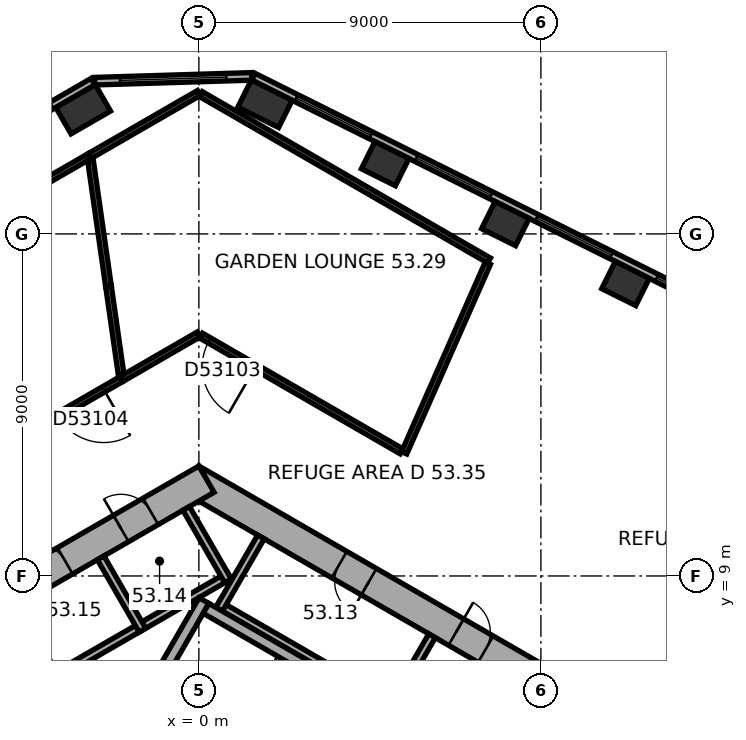
"""IFC4 building model, lengths in metres.
Left out: names, types, materials, properties, quantities, classifications, styles, units other than length and angle.
Written with IfcOpenShell. Run it as: python <this file> out.ifc"""

import sys

from ifc_helpers import new_model, si_unit, direction, frame, frame_2d, origin, origin_2d, place, context, subcontext, project, spatial, rectangle, extrude, element, fill, save


model = new_model("IFC4")
c1 = context("Model", 3, precision=1e-05, world=origin(), true_north=direction((0.0, 1.0)))
c2 = subcontext(c1, "Body", "Model", "MODEL_VIEW")
j1 = project(units=[si_unit("LENGTHUNIT", "METRE"), si_unit("PLANEANGLEUNIT", "RADIAN")], contexts=[c1])
p1 = place(None, origin())
s1 = spatial("IfcSite", under=j1, at=p1, CompositionType="ELEMENT")
p2 = place(p1, origin())
s2 = spatial("IfcBuilding", under=s1, at=p2, CompositionType="ELEMENT")
p3 = place(p2, frame((0.0, 0.0, 214.3)))
s3 = spatial("IfcBuildingStorey", under=s2, at=p3, CompositionType="ELEMENT", Elevation=214.3)
for number, where, z_axis, x_axis in (
    (1, (11.227, 16.695, 0.0), (0.0, 0.0, 1.0), (-0.895, 0.446, 0.0)),
    (2, (8.064, 18.271, 0.0), (0.0, 0.0, 1.0), (-0.895, 0.446, 0.0)),
    (3, (4.902, 19.848, 0.0), (0.0, 0.0, 1.0), (-0.895, 0.446, 0.0)),
):
    element("IfcColumn", number, at=place(p3, frame(where, z_axis=z_axis, x_axis=x_axis)), inside=s3, PredefinedType="COLUMN", context=c2, shape_type="SweptSolid", body=[
        extrude(rectangle(XDim=1.0, YDim=0.8, at=origin_2d()), origin(), (0.0, 0.0, 1.0), 7.4),
    ])
for number, where, z_axis, x_axis in (
    (4, (1.74, 21.425, 0.0), (0.0, 0.0, 1.0), (-0.895, 0.446, 0.0)),
    (5, (-3.044, 21.279, 0.0), (0.0, 0.0, 1.0), (-0.866, -0.5, 0.0)),
):
    element("IfcColumn", number, at=place(p3, frame(where, z_axis=z_axis, x_axis=x_axis)), inside=s3, PredefinedType="COLUMN", context=c2, shape_type="SweptSolid", body=[
        extrude(rectangle(XDim=1.2, YDim=0.8, at=origin_2d()), origin(), (0.0, 0.0, 1.0), 7.4),
    ])
p4 = place(p3, frame((10.1, 5.6, 0.0), z_axis=(0.0, 0.0, 1.0), x_axis=(-0.866023897231, 0.500002609418, 0.0)))
e6 = element("IfcWall", 6, at=p4, inside=s3, PredefinedType="SHEAR", context=c2, shape_type="SweptSolid", body=[
    extrude(rectangle(XDim=11.894, YDim=0.8, at=frame_2d((5.947, 0.0))), origin(), (0.0, 0.0, 1.0), 7.4),
])
p5 = place(p4, frame((2.947, 0.0, 0.0)))
e7 = element("IfcOpeningElement", 7, at=p5, cuts=e6, PredefinedType="OPENING", context=c2, shape_type="SweptSolid", body=[
    extrude(rectangle(XDim=0.9, YDim=2.1, at=frame_2d((0.45, 1.05))), frame((0.0, 0.41, 0.0), z_axis=(0.0, -1.0, 0.0), x_axis=(1.0, 0.0, 0.0)), (0.0, 0.0, 1.0), 0.82),
])
p6 = place(p4, frame((6.497, 0.0, 0.0)))
e8 = element("IfcOpeningElement", 8, at=p6, cuts=e6, PredefinedType="OPENING", context=c2, shape_type="SweptSolid", body=[
    extrude(rectangle(XDim=0.9, YDim=2.1, at=frame_2d((0.45, 1.05))), frame((0.0, 0.41, 0.0), z_axis=(0.0, -1.0, 0.0), x_axis=(1.0, 0.0, 0.0)), (0.0, 0.0, 1.0), 0.82),
])
p7 = place(p3, frame((0.2, 11.547, 0.0), z_axis=(0.0, 0.0, 1.0), x_axis=(-0.866023897231, -0.500002609418, 0.0)))
e9 = element("IfcWall", 9, at=p7, inside=s3, PredefinedType="SHEAR", context=c2, shape_type="SweptSolid", body=[
    extrude(rectangle(XDim=11.894, YDim=0.8, at=frame_2d((5.947, 0.0))), origin(), (0.0, 0.0, 1.0), 7.4),
])
p8 = place(p7, frame((6.147, 0.0, 0.0)))
e10 = element("IfcOpeningElement", 10, at=p8, cuts=e9, PredefinedType="OPENING", context=c2, shape_type="SweptSolid", body=[
    extrude(rectangle(XDim=1.5, YDim=2.1, at=frame_2d((0.75, 1.05))), frame((0.0, 0.41, 0.0), z_axis=(0.0, -1.0, 0.0), x_axis=(1.0, 0.0, 0.0)), (0.0, 0.0, 1.0), 0.82),
])
p9 = place(p7, frame((1.697, 0.0, 0.0)))
e11 = element("IfcOpeningElement", 11, at=p9, cuts=e9, PredefinedType="OPENING", context=c2, shape_type="SweptSolid", body=[
    extrude(rectangle(XDim=0.9, YDim=2.1, at=frame_2d((0.45, 1.05))), frame((0.0, 0.41, 0.0), z_axis=(0.0, -1.0, 0.0), x_axis=(1.0, 0.0, 0.0)), (0.0, 0.0, 1.0), 0.82),
])
p10 = place(p7, frame((4.297, 0.0, 0.0)))
e12 = element("IfcOpeningElement", 12, at=p10, cuts=e9, PredefinedType="OPENING", context=c2, shape_type="SweptSolid", body=[
    extrude(rectangle(XDim=0.9, YDim=2.1, at=frame_2d((0.45, 1.05))), frame((0.0, 0.41, 0.0), z_axis=(0.0, -1.0, 0.0), x_axis=(1.0, 0.0, 0.0)), (0.0, 0.0, 1.0), 0.82),
])
p11 = place(p3, frame((18.299, 13.727, 0.0), z_axis=(0.0, 0.0, 1.0), x_axis=(-0.894934554817, 0.44619742558, 0.0)))
e13 = element("IfcWall", 13, at=p11, inside=s3, PredefinedType="STANDARD", context=c2, shape_type="SweptSolid", body=[
    extrude(rectangle(XDim=18.841, YDim=0.2, at=frame_2d((9.421, 0.0))), origin(), (0.0, 0.0, 1.0), 7.4),
])
p12 = place(p11, frame((1.253, 0.0, 0.8)))
e14 = element("IfcOpeningElement", 14, at=p12, cuts=e13, PredefinedType="OPENING", context=c2, shape_type="SweptSolid", body=[
    extrude(rectangle(XDim=2.2, YDim=4.2, at=frame_2d((1.1, 2.1))), frame((0.0, 0.11, 0.0), z_axis=(0.0, -1.0, 0.0), x_axis=(1.0, 0.0, 0.0)), (0.0, 0.0, 1.0), 0.22),
])
p13 = place(p11, frame((4.786, 0.0, 0.8)))
e15 = element("IfcOpeningElement", 15, at=p13, cuts=e13, PredefinedType="OPENING", context=c2, shape_type="SweptSolid", body=[
    extrude(rectangle(XDim=2.2, YDim=4.2, at=frame_2d((1.1, 2.1))), frame((0.0, 0.11, 0.0), z_axis=(0.0, -1.0, 0.0), x_axis=(1.0, 0.0, 0.0)), (0.0, 0.0, 1.0), 0.22),
])
p14 = place(p11, frame((8.32, 0.0, 0.8)))
e16 = element("IfcOpeningElement", 16, at=p14, cuts=e13, PredefinedType="OPENING", context=c2, shape_type="SweptSolid", body=[
    extrude(rectangle(XDim=2.2, YDim=4.2, at=frame_2d((1.1, 2.1))), frame((0.0, 0.11, 0.0), z_axis=(0.0, -1.0, 0.0), x_axis=(1.0, 0.0, 0.0)), (0.0, 0.0, 1.0), 0.22),
])
p15 = place(p11, frame((11.854, 0.0, 0.8)))
e17 = element("IfcOpeningElement", 17, at=p15, cuts=e13, PredefinedType="OPENING", context=c2, shape_type="SweptSolid", body=[
    extrude(rectangle(XDim=2.2, YDim=4.2, at=frame_2d((1.1, 2.1))), frame((0.0, 0.11, 0.0), z_axis=(0.0, -1.0, 0.0), x_axis=(1.0, 0.0, 0.0)), (0.0, 0.0, 1.0), 0.22),
])
p16 = place(p11, frame((15.387, 0.0, 0.8)))
e18 = element("IfcOpeningElement", 18, at=p16, cuts=e13, PredefinedType="OPENING", context=c2, shape_type="SweptSolid", body=[
    extrude(rectangle(XDim=2.2, YDim=4.2, at=frame_2d((1.1, 2.1))), frame((0.0, 0.11, 0.0), z_axis=(0.0, -1.0, 0.0), x_axis=(1.0, 0.0, 0.0)), (0.0, 0.0, 1.0), 0.22),
])
p17 = place(p3, frame((1.389, 22.145, 0.0), z_axis=(0.0, 0.0, 1.0), x_axis=(-0.999534702881, -0.030502093955, 0.0)))
e19 = element("IfcWall", 19, at=p17, inside=s3, PredefinedType="STANDARD", context=c2, shape_type="SweptSolid", body=[
    extrude(rectangle(XDim=4.13, YDim=0.2, at=frame_2d((2.065, 0.0))), origin(), (0.0, 0.0, 1.0), 7.4),
])
p18 = place(p17, frame((0.665, 0.0, 0.8)))
e20 = element("IfcOpeningElement", 20, at=p18, cuts=e19, PredefinedType="OPENING", context=c2, shape_type="SweptSolid", body=[
    extrude(rectangle(XDim=2.8, YDim=4.2, at=frame_2d((1.4, 2.1))), frame((0.0, 0.11, 0.0), z_axis=(0.0, -1.0, 0.0), x_axis=(1.0, 0.0, 0.0)), (0.0, 0.0, 1.0), 0.22),
])
p19 = place(p3, frame((-2.786, 22.005, 0.0), z_axis=(0.0, 0.0, 1.0), x_axis=(-0.866026555358, -0.49999800541, 0.0)))
e21 = element("IfcWall", 21, at=p19, inside=s3, PredefinedType="STANDARD", context=c2, shape_type="SweptSolid", body=[
    extrude(rectangle(XDim=18.841, YDim=0.2, at=frame_2d((9.421, 0.0))), origin(), (0.0, 0.0, 1.0), 7.4),
])
p20 = place(p19, frame((1.254, 0.0, 0.8)))
e22 = element("IfcOpeningElement", 22, at=p20, cuts=e21, PredefinedType="OPENING", context=c2, shape_type="SweptSolid", body=[
    extrude(rectangle(XDim=2.2, YDim=4.2, at=frame_2d((1.1, 2.1))), frame((0.0, 0.11, 0.0), z_axis=(0.0, -1.0, 0.0), x_axis=(1.0, 0.0, 0.0)), (0.0, 0.0, 1.0), 0.22),
])
p21 = place(p19, frame((4.788, 0.0, 0.8)))
e23 = element("IfcOpeningElement", 23, at=p21, cuts=e21, PredefinedType="OPENING", context=c2, shape_type="SweptSolid", body=[
    extrude(rectangle(XDim=2.2, YDim=4.2, at=frame_2d((1.1, 2.1))), frame((0.0, 0.11, 0.0), z_axis=(0.0, -1.0, 0.0), x_axis=(1.0, 0.0, 0.0)), (0.0, 0.0, 1.0), 0.22),
])
p22 = place(p19, frame((8.321, 0.0, 0.8)))
e24 = element("IfcOpeningElement", 24, at=p22, cuts=e21, PredefinedType="OPENING", context=c2, shape_type="SweptSolid", body=[
    extrude(rectangle(XDim=2.2, YDim=4.2, at=frame_2d((1.1, 2.1))), frame((0.0, 0.11, 0.0), z_axis=(0.0, -1.0, 0.0), x_axis=(1.0, 0.0, 0.0)), (0.0, 0.0, 1.0), 0.22),
])
p23 = place(p19, frame((11.855, 0.0, 0.8)))
e25 = element("IfcOpeningElement", 25, at=p23, cuts=e21, PredefinedType="OPENING", context=c2, shape_type="SweptSolid", body=[
    extrude(rectangle(XDim=2.2, YDim=4.2, at=frame_2d((1.1, 2.1))), frame((0.0, 0.11, 0.0), z_axis=(0.0, -1.0, 0.0), x_axis=(1.0, 0.0, 0.0)), (0.0, 0.0, 1.0), 0.22),
])
p24 = place(p19, frame((15.389, 0.0, 0.8)))
e26 = element("IfcOpeningElement", 26, at=p24, cuts=e21, PredefinedType="OPENING", context=c2, shape_type="SweptSolid", body=[
    extrude(rectangle(XDim=2.2, YDim=4.2, at=frame_2d((1.1, 2.1))), frame((0.0, 0.11, 0.0), z_axis=(0.0, -1.0, 0.0), x_axis=(1.0, 0.0, 0.0)), (0.0, 0.0, 1.0), 0.22),
])
p25 = place(p3, frame((7.424, 4.259, 0.0), z_axis=(0.0, 0.0, 1.0), x_axis=(-0.866026010844, 0.49999894854, 0.0)))
e27 = element("IfcWall", 27, at=p25, inside=s3, PredefinedType="PARTITIONING", context=c2, shape_type="SweptSolid", body=[
    extrude(rectangle(XDim=8.0, YDim=0.2, at=frame_2d((4.0, 0.0))), origin(), (0.0, 0.0, 1.0), 7.12),
])
for number, where, z_axis, x_axis in (
    (28, (5.036, 5.522, 0.0), (0.0, 0.0, 1.0), (0.5, 0.866, 0.0)),
    (29, (0.532, 8.122, 0.0), (0.0, 0.0, 1.0), (0.5, 0.866, 0.0)),
):
    element("IfcWall", number, at=place(p3, frame(where, z_axis=z_axis, x_axis=x_axis)), inside=s3, PredefinedType="PARTITIONING", context=c2, shape_type="SweptSolid", body=[
        extrude(rectangle(XDim=2.2, YDim=0.2, at=frame_2d((1.1, 0.0))), origin(), (0.0, 0.0, 1.0), 7.12),
    ])
p26 = place(p3, frame((0.803, 9.009, 0.0), z_axis=(0.0, 0.0, 1.0), x_axis=(-0.866028230842, -0.499995103361, 0.0)))
e30 = element("IfcWall", 30, at=p26, inside=s3, PredefinedType="PARTITIONING", context=c2, shape_type="SweptSolid", body=[
    extrude(rectangle(XDim=5.4, YDim=0.2, at=frame_2d((2.7, 0.0))), origin(), (0.0, 0.0, 1.0), 7.12),
])
p27 = place(p3, frame((0.767, 8.872, 0.0), z_axis=(0.0, 0.0, 1.0), x_axis=(-0.499994660107, 0.866028486751, 0.0)))
e31 = element("IfcWall", 31, at=p27, inside=s3, PredefinedType="PARTITIONING", context=c2, shape_type="SweptSolid", body=[
    extrude(rectangle(XDim=2.2, YDim=0.2, at=frame_2d((1.1, 0.0))), origin(), (0.0, 0.0, 1.0), 7.12),
])
for number, where, z_axis, x_axis in (
    (32, (-1.485, 7.572, 0.0), (0.0, 0.0, 1.0), (-0.5, 0.866, 0.0)),
    (33, (-3.737, 6.272, 0.0), (0.0, 0.0, 1.0), (-0.5, 0.866, 0.0)),
):
    element("IfcWall", number, at=place(p3, frame(where, z_axis=z_axis, x_axis=x_axis)), inside=s3, PredefinedType="PARTITIONING", context=c2, shape_type="SweptSolid", body=[
        extrude(rectangle(XDim=2.2, YDim=0.2, at=frame_2d((1.1, 0.0))), origin(), (0.0, 0.0, 1.0), 7.12),
    ])
p28 = place(p3, frame((-2.216, 4.282, 0.0), z_axis=(0.0, 0.0, 1.0), x_axis=(0.499977259774, 0.866038532462, 0.0)))
e34 = element("IfcWall", 34, at=p28, inside=s3, PredefinedType="SHEAR", context=c2, shape_type="SweptSolid", body=[
    extrude(rectangle(XDim=4.7, YDim=0.3, at=frame_2d((2.35, 0.0))), origin(), (0.0, 0.0, 1.0), 7.12),
])
p29 = place(p3, frame((6.303, 4.617, 0.0), z_axis=(0.0, 0.0, 1.0), x_axis=(-0.866027801685, 0.499995846692, 0.0)))
e35 = element("IfcWall", 35, at=p29, inside=s3, PredefinedType="SHEAR", context=c2, shape_type="SweptSolid", body=[
    extrude(rectangle(XDim=7.06, YDim=0.3, at=frame_2d((3.53, 0.0))), origin(), (0.0, 0.0, 1.0), 7.12),
])
p30 = place(p3, frame((5.333, 12.279, 0.0), z_axis=(0.0, 0.0, 1.0), x_axis=(-0.86606339888, 0.499934184788, 0.0)))
e36 = element("IfcWall", 36, at=p30, inside=s3, PredefinedType="PARTITIONING", context=c2, shape_type="SweptSolid", body=[
    extrude(rectangle(XDim=6.089, YDim=0.15, at=frame_2d((3.044, 0.0))), origin(), (0.0, 0.0, 1.0), 7.12),
])
p31 = place(p30, frame((4.439, 0.0, 0.0)))
e37 = element("IfcOpeningElement", 37, at=p31, cuts=e36, PredefinedType="OPENING", context=c2, shape_type="SweptSolid", body=[
    extrude(rectangle(XDim=1.4, YDim=2.4, at=frame_2d((0.7, 1.2))), frame((0.0, 0.085, 0.0), z_axis=(0.0, -1.0, 0.0), x_axis=(1.0, 0.0, 0.0)), (0.0, 0.0, 1.0), 0.17),
])
p32 = place(p3, frame((-2.03, 14.186, 0.0), z_axis=(0.0, 0.0, 1.0), x_axis=(-0.866034287694, -0.499984612302, 0.0)))
e38 = element("IfcWall", 38, at=p32, inside=s3, PredefinedType="PARTITIONING", context=c2, shape_type="SweptSolid", body=[
    extrude(rectangle(XDim=7.067, YDim=0.15, at=frame_2d((3.534, 0.0))), origin(), (0.0, 0.0, 1.0), 7.12),
])
p33 = place(p32, frame((0.55, 0.0, 0.0)))
e39 = element("IfcOpeningElement", 39, at=p33, cuts=e38, PredefinedType="OPENING", context=c2, shape_type="SweptSolid", body=[
    extrude(rectangle(XDim=1.4, YDim=2.4, at=frame_2d((0.7, 1.2))), frame((0.0, 0.085, 0.0), z_axis=(0.0, -1.0, 0.0), x_axis=(1.0, 0.0, 0.0)), (0.0, 0.0, 1.0), 0.17),
])
p34 = place(p3, frame((-11.521, 15.057, 0.0), z_axis=(0.0, 0.0, 1.0), x_axis=(0.866020763381, 0.500008037328, 0.0)))
e40 = element("IfcWall", 40, at=p34, inside=s3, PredefinedType="PARTITIONING", context=c2, shape_type="SweptSolid", body=[
    extrude(rectangle(XDim=9.99, YDim=0.15, at=frame_2d((4.995, 0.0))), origin(), (0.0, 0.0, 1.0), 7.12),
])
p35 = place(p3, frame((0.0, 15.357, 0.0), z_axis=(0.0, 0.0, 1.0), x_axis=(-0.866003425329, -0.50003806587, 0.0)))
e41 = element("IfcWall", 41, at=p35, inside=s3, PredefinedType="PARTITIONING", context=c2, shape_type="SweptSolid", body=[
    extrude(rectangle(XDim=2.344, YDim=0.15, at=frame_2d((1.172, 0.0))), origin(), (0.0, 0.0, 1.0), 7.12),
])
p36 = place(p3, frame((-2.378, 16.623, 0.0), z_axis=(0.0, 0.0, 1.0), x_axis=(0.141669455773, -0.989914019146, 0.0)))
e42 = element("IfcWall", 42, at=p36, inside=s3, PredefinedType="PARTITIONING", context=c2, shape_type="SweptSolid", body=[
    extrude(rectangle(XDim=2.342, YDim=0.15, at=frame_2d((1.171, 0.0))), origin(), (0.0, 0.0, 1.0), 6.57),
])
p37 = place(p3, frame((-2.378, 16.623, 0.0), z_axis=(0.0, 0.0, 1.0), x_axis=(-0.141625761538, 0.98992027137, 0.0)))
e43 = element("IfcWall", 43, at=p37, inside=s3, PredefinedType="PARTITIONING", context=c2, shape_type="SweptSolid", body=[
    extrude(rectangle(XDim=3.344, YDim=0.15, at=frame_2d((1.672, 0.0))), origin(), (0.0, 0.0, 1.0), 6.57),
])
p38 = place(p3, frame((7.603, 17.227, 0.0), z_axis=(0.0, 0.0, 1.0), x_axis=(-0.403743838664, -0.914872074523, 0.0)))
e44 = element("IfcWall", 44, at=p38, inside=s3, PredefinedType="PARTITIONING", context=c2, shape_type="SweptSolid", body=[
    extrude(rectangle(XDim=5.452, YDim=0.15, at=frame_2d((2.726, 0.0))), origin(), (0.0, 0.0, 1.0), 7.12),
])
p39 = place(p3, frame((-2.869, 20.052, 0.0), z_axis=(0.0, 0.0, 1.0), x_axis=(0.866007628942, 0.500030785667, 0.0)))
e45 = element("IfcWall", 45, at=p39, inside=s3, PredefinedType="PARTITIONING", context=c2, shape_type="SweptSolid", body=[
    extrude(rectangle(XDim=3.313, YDim=0.15, at=frame_2d((1.656, 0.0))), origin(), (0.0, 0.0, 1.0), 7.12),
])
p40 = place(p3, frame((0.052, 21.678, 0.0), z_axis=(0.0, 0.0, 1.0), x_axis=(0.866021227388, -0.500007233661, 0.0)))
e46 = element("IfcWall", 46, at=p40, inside=s3, PredefinedType="PARTITIONING", context=c2, shape_type="SweptSolid", body=[
    extrude(rectangle(XDim=8.757, YDim=0.15, at=frame_2d((4.378, 0.0))), origin(), (0.0, 0.0, 1.0), 7.12),
])
p41 = place(p13, origin())
e47 = element("IfcWindow", 47, at=p41, inside=s3, PartitioningType="SINGLE_PANEL", PredefinedType="WINDOW", context=c2, shape_type="SweptSolid", body=[
    extrude(rectangle(XDim=2.2, YDim=4.2, at=frame_2d((1.1, 2.1))), frame((0.0, 0.03, 0.0), z_axis=(0.0, -1.0, 0.0), x_axis=(1.0, 0.0, 0.0)), (0.0, 0.0, 1.0), 0.06),
])
fill(e15, e47)
p42 = place(p14, origin())
e48 = element("IfcWindow", 48, at=p42, inside=s3, PartitioningType="SINGLE_PANEL", PredefinedType="WINDOW", context=c2, shape_type="SweptSolid", body=[
    extrude(rectangle(XDim=2.2, YDim=4.2, at=frame_2d((1.1, 2.1))), frame((0.0, 0.03, 0.0), z_axis=(0.0, -1.0, 0.0), x_axis=(1.0, 0.0, 0.0)), (0.0, 0.0, 1.0), 0.06),
])
fill(e16, e48)
p43 = place(p15, origin())
e49 = element("IfcWindow", 49, at=p43, inside=s3, PartitioningType="SINGLE_PANEL", PredefinedType="WINDOW", context=c2, shape_type="SweptSolid", body=[
    extrude(rectangle(XDim=2.2, YDim=4.2, at=frame_2d((1.1, 2.1))), frame((0.0, 0.03, 0.0), z_axis=(0.0, -1.0, 0.0), x_axis=(1.0, 0.0, 0.0)), (0.0, 0.0, 1.0), 0.06),
])
fill(e17, e49)
p44 = place(p16, origin())
e50 = element("IfcWindow", 50, at=p44, inside=s3, PartitioningType="SINGLE_PANEL", PredefinedType="WINDOW", context=c2, shape_type="SweptSolid", body=[
    extrude(rectangle(XDim=2.2, YDim=4.2, at=frame_2d((1.1, 2.1))), frame((0.0, 0.03, 0.0), z_axis=(0.0, -1.0, 0.0), x_axis=(1.0, 0.0, 0.0)), (0.0, 0.0, 1.0), 0.06),
])
fill(e18, e50)
p45 = place(p18, origin())
e51 = element("IfcWindow", 51, at=p45, inside=s3, PartitioningType="SINGLE_PANEL", PredefinedType="WINDOW", context=c2, shape_type="SweptSolid", body=[
    extrude(rectangle(XDim=2.8, YDim=4.2, at=frame_2d((1.4, 2.1))), frame((0.0, 0.03, 0.0), z_axis=(0.0, -1.0, 0.0), x_axis=(1.0, 0.0, 0.0)), (0.0, 0.0, 1.0), 0.06),
])
fill(e20, e51)
p46 = place(p20, origin())
e52 = element("IfcWindow", 52, at=p46, inside=s3, PartitioningType="SINGLE_PANEL", PredefinedType="WINDOW", context=c2, shape_type="SweptSolid", body=[
    extrude(rectangle(XDim=2.2, YDim=4.2, at=frame_2d((1.1, 2.1))), frame((0.0, 0.03, 0.0), z_axis=(0.0, -1.0, 0.0), x_axis=(1.0, 0.0, 0.0)), (0.0, 0.0, 1.0), 0.06),
])
fill(e22, e52)
p47 = place(p5, origin())
e53 = element("IfcDoor", 53, at=p47, inside=s3, OperationType="SINGLE_SWING_LEFT", PredefinedType="DOOR", context=c2, shape_type="SweptSolid", body=[
    extrude(rectangle(XDim=0.9, YDim=2.1, at=frame_2d((0.45, 1.05))), frame((0.0, 0.025, 0.0), z_axis=(0.0, -1.0, 0.0), x_axis=(1.0, 0.0, 0.0)), (0.0, 0.0, 1.0), 0.05),
])
fill(e7, e53)
p48 = place(p6, origin())
e54 = element("IfcDoor", 54, at=p48, inside=s3, OperationType="SINGLE_SWING_LEFT", PredefinedType="DOOR", context=c2, shape_type="SweptSolid", body=[
    extrude(rectangle(XDim=0.9, YDim=2.1, at=frame_2d((0.45, 1.05))), frame((0.0, 0.025, 0.0), z_axis=(0.0, -1.0, 0.0), x_axis=(1.0, 0.0, 0.0)), (0.0, 0.0, 1.0), 0.05),
])
fill(e8, e54)
p49 = place(p9, origin())
e55 = element("IfcDoor", 55, at=p49, inside=s3, OperationType="SINGLE_SWING_LEFT", PredefinedType="DOOR", context=c2, shape_type="SweptSolid", body=[
    extrude(rectangle(XDim=0.9, YDim=2.1, at=frame_2d((0.45, 1.05))), frame((0.0, 0.025, 0.0), z_axis=(0.0, -1.0, 0.0), x_axis=(1.0, 0.0, 0.0)), (0.0, 0.0, 1.0), 0.05),
])
fill(e11, e55)
p50 = place(p10, origin())
e56 = element("IfcDoor", 56, at=p50, inside=s3, OperationType="SINGLE_SWING_LEFT", PredefinedType="DOOR", context=c2, shape_type="SweptSolid", body=[
    extrude(rectangle(XDim=0.9, YDim=2.1, at=frame_2d((0.45, 1.05))), frame((0.0, 0.025, 0.0), z_axis=(0.0, -1.0, 0.0), x_axis=(1.0, 0.0, 0.0)), (0.0, 0.0, 1.0), 0.05),
])
fill(e12, e56)
p51 = place(p31, origin())
e57 = element("IfcDoor", 57, at=p51, inside=s3, OperationType="SINGLE_SWING_LEFT", PredefinedType="DOOR", context=c2, shape_type="SweptSolid", body=[
    extrude(rectangle(XDim=1.4, YDim=2.4, at=frame_2d((0.7, 1.2))), frame((0.0, 0.025, 0.0), z_axis=(0.0, -1.0, 0.0), x_axis=(1.0, 0.0, 0.0)), (0.0, 0.0, 1.0), 0.05),
])
fill(e37, e57)
p52 = place(p33, origin())
e58 = element("IfcDoor", 58, at=p52, inside=s3, OperationType="SINGLE_SWING_LEFT", PredefinedType="DOOR", context=c2, shape_type="SweptSolid", body=[
    extrude(rectangle(XDim=1.4, YDim=2.4, at=frame_2d((0.7, 1.2))), frame((0.0, 0.025, 0.0), z_axis=(0.0, -1.0, 0.0), x_axis=(1.0, 0.0, 0.0)), (0.0, 0.0, 1.0), 0.05),
])
fill(e39, e58)
save(model, sys.argv[1])
